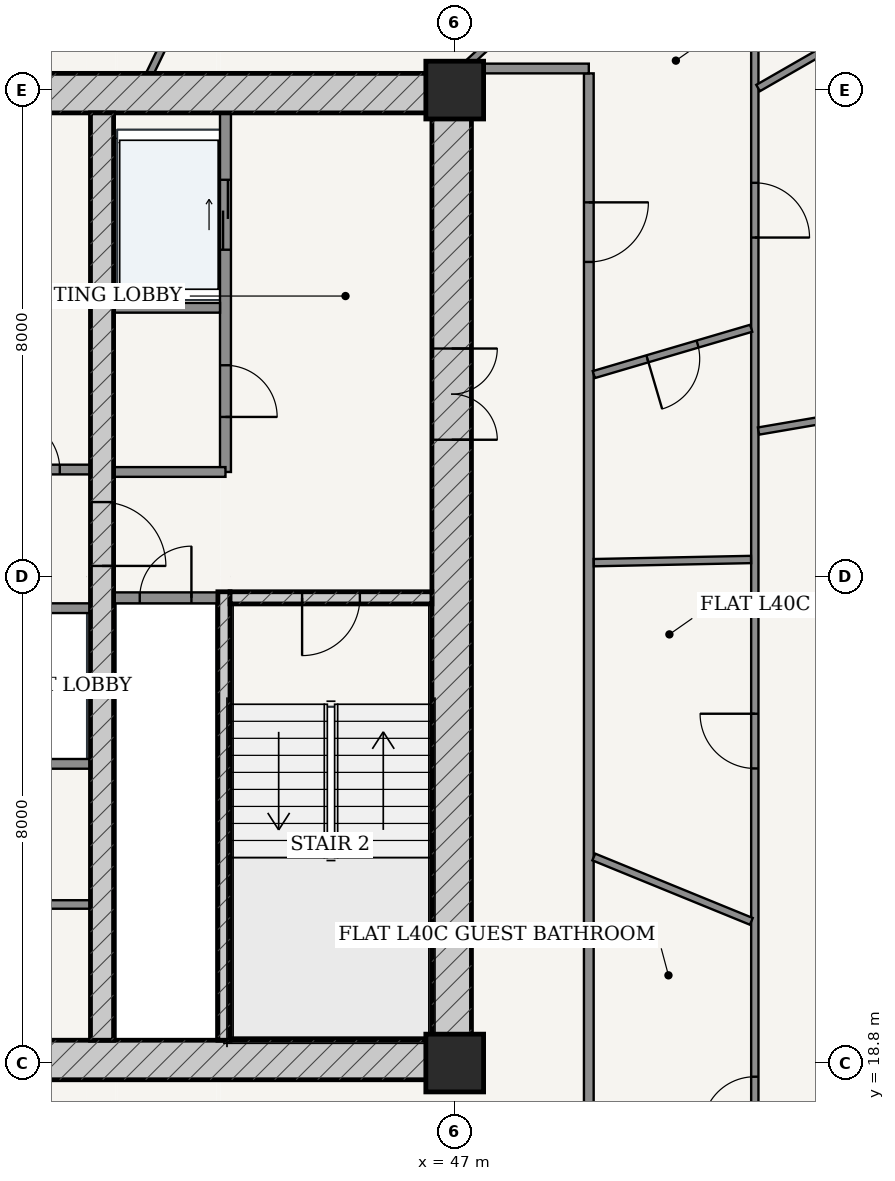
"""IFC4 building model, lengths in metres.
Left out: names, types, materials, properties, quantities, classifications, styles, units other than length and angle.
Written with IfcOpenShell. Run it as: python <this file> out.ifc"""

import sys

from ifc_helpers import new_model, si_unit, direction, frame, frame_2d, origin, origin_2d, place, context, subcontext, project, spatial, rectangle, extrude, source, transform, mapped, element, fill, save


model = new_model("IFC4")
c1 = context("Model", 3, precision=1e-05, world=origin(), true_north=direction((-0.2419218956, 0.970295726276)))
c2 = subcontext(c1, "Body", "Model", "MODEL_VIEW")
j1 = project(units=[si_unit("LENGTHUNIT", "METRE"), si_unit("PLANEANGLEUNIT", "RADIAN")], contexts=[c1])
p1 = place(None, origin())
s1 = spatial("IfcSite", under=j1, at=p1, CompositionType="ELEMENT")
p2 = place(p1, origin())
s2 = spatial("IfcBuilding", under=s1, at=p2, CompositionType="ELEMENT")
p3 = place(p2, frame((0.0, 0.0, 153.4)))
s3 = spatial("IfcBuildingStorey", under=s2, at=p3, CompositionType="ELEMENT", Elevation=153.4)
for number, where, z_axis, x_axis in (
    (1, (47.0, 18.8, 0.0), (0.0, 0.0, 1.0), (1.0, 0.0, 0.0)),
    (2, (47.0, 34.8, 0.0), (0.0, 0.0, 1.0), (1.0, 0.0, 0.0)),
):
    element("IfcColumn", number, at=place(p3, frame(where, z_axis=z_axis, x_axis=x_axis)), inside=s3, PredefinedType="COLUMN", context=c2, shape_type="SweptSolid", body=[
        extrude(rectangle(XDim=0.95, YDim=0.95, at=origin_2d()), origin(), (0.0, 0.0, 1.0), 3.6),
    ])
p4 = place(p3, frame((28.725, 18.85, 0.0), z_axis=(0.0, 0.0, 1.0), x_axis=(1.0, 0.0, 0.0)))
e3 = element("IfcWall", 3, at=p4, inside=s3, PredefinedType="SHEAR", context=c2, shape_type="SweptSolid", body=[
    extrude(rectangle(XDim=18.55, YDim=0.65, at=frame_2d((9.275, 0.0))), origin(), (0.0, 0.0, 1.0), 3.33),
])
p5 = place(p4, frame((7.51, 0.0, 0.0)))
e4 = element("IfcOpeningElement", 4, at=p5, cuts=e3, PredefinedType="OPENING", context=c2, shape_type="SweptSolid", body=[
    extrude(rectangle(XDim=0.85, YDim=2.1, at=frame_2d((0.425, 1.05))), frame((0.0, 0.335, 0.0), z_axis=(0.0, -1.0, 0.0), x_axis=(1.0, 0.0, 0.0)), (0.0, 0.0, 1.0), 0.67),
])
p6 = place(p4, frame((10.59, 0.0, 0.0)))
e5 = element("IfcOpeningElement", 5, at=p6, cuts=e3, PredefinedType="OPENING", context=c2, shape_type="SweptSolid", body=[
    extrude(rectangle(XDim=0.85, YDim=2.1, at=frame_2d((0.425, 1.05))), frame((0.0, 0.335, 0.0), z_axis=(0.0, -1.0, 0.0), x_axis=(1.0, 0.0, 0.0)), (0.0, 0.0, 1.0), 0.67),
])
p7 = place(p3, frame((28.725, 34.75, 0.0), z_axis=(0.0, 0.0, 1.0), x_axis=(1.0, 0.0, 0.0)))
e6 = element("IfcWall", 6, at=p7, inside=s3, PredefinedType="SHEAR", context=c2, shape_type="SweptSolid", body=[
    extrude(rectangle(XDim=18.55, YDim=0.65, at=frame_2d((9.275, 0.0))), origin(), (0.0, 0.0, 1.0), 3.33),
])
p8 = place(p3, frame((46.95, 19.175, 0.0), z_axis=(0.0, 0.0, 1.0), x_axis=(0.0, 1.0, 0.0)))
e7 = element("IfcWall", 7, at=p8, inside=s3, PredefinedType="SHEAR", context=c2, shape_type="SweptSolid", body=[
    extrude(rectangle(XDim=15.25, YDim=0.65, at=frame_2d((7.625, 0.0))), origin(), (0.0, 0.0, 1.0), 3.33),
])
p9 = place(p8, frame((9.875, 0.0, 0.0)))
e8 = element("IfcOpeningElement", 8, at=p9, cuts=e7, PredefinedType="OPENING", context=c2, shape_type="SweptSolid", body=[
    extrude(rectangle(XDim=1.5, YDim=2.2, at=frame_2d((0.75, 1.1))), frame((0.0, 0.335, 0.0), z_axis=(0.0, -1.0, 0.0), x_axis=(1.0, 0.0, 0.0)), (0.0, 0.0, 1.0), 0.67),
])
p10 = place(p3, frame((43.205, 19.175, 0.0), z_axis=(0.0, 0.0, 1.0), x_axis=(0.0, 1.0, 0.0)))
e9 = element("IfcWall", 9, at=p10, inside=s3, PredefinedType="SOLIDWALL", context=c2, shape_type="SweptSolid", body=[
    extrude(rectangle(XDim=7.375, YDim=0.2, at=frame_2d((3.688, 0.0))), origin(), (0.0, 0.0, 1.0), 3.33),
])
p11 = place(p3, frame((43.305, 26.45, 0.0), z_axis=(0.0, 0.0, 1.0), x_axis=(1.0, 0.0, 0.0)))
e10 = element("IfcWall", 10, at=p11, inside=s3, PredefinedType="SOLIDWALL", context=c2, shape_type="SweptSolid", body=[
    extrude(rectangle(XDim=3.32, YDim=0.2, at=frame_2d((1.66, 0.0))), origin(), (0.0, 0.0, 1.0), 3.33),
])
p12 = place(p11, frame((1.185, 0.0, 0.0)))
e11 = element("IfcOpeningElement", 11, at=p12, cuts=e10, PredefinedType="OPENING", context=c2, shape_type="SweptSolid", body=[
    extrude(rectangle(XDim=0.95, YDim=2.15, at=frame_2d((0.475, 1.075))), frame((0.0, 0.11, 0.0), z_axis=(0.0, -1.0, 0.0), x_axis=(1.0, 0.0, 0.0)), (0.0, 0.0, 1.0), 0.22),
])
p13 = place(p3, frame((41.2, 19.175, 0.0), z_axis=(0.0, 0.0, 1.0), x_axis=(0.0, 1.0, 0.0)))
e12 = element("IfcWall", 12, at=p13, inside=s3, PredefinedType="SHEAR", context=c2, shape_type="SweptSolid", body=[
    extrude(rectangle(XDim=15.25, YDim=0.38, at=frame_2d((7.625, 0.0))), origin(), (0.0, 0.0, 1.0), 3.33),
])
p14 = place(p13, frame((7.8, 0.0, 0.0)))
e13 = element("IfcOpeningElement", 13, at=p14, cuts=e12, PredefinedType="OPENING", context=c2, shape_type="SweptSolid", body=[
    extrude(rectangle(XDim=1.05, YDim=2.15, at=frame_2d((0.525, 1.075))), frame((0.0, 0.2, 0.0), z_axis=(0.0, -1.0, 0.0), x_axis=(1.0, 0.0, 0.0)), (0.0, 0.0, 1.0), 0.4),
])
p15 = place(p3, frame((41.39, 26.45, 0.0), z_axis=(0.0, 0.0, 1.0), x_axis=(1.0, 0.0, 0.0)))
e14 = element("IfcWall", 14, at=p15, inside=s3, PredefinedType="PARTITIONING", context=c2, shape_type="SweptSolid", body=[
    extrude(rectangle(XDim=1.71, YDim=0.18, at=frame_2d((0.855, 0.0))), origin(), (0.0, 0.0, 1.0), 3.33),
])
p16 = place(p15, frame((0.43, 0.0, 0.0)))
e15 = element("IfcOpeningElement", 15, at=p16, cuts=e14, PredefinedType="OPENING", context=c2, shape_type="SweptSolid", body=[
    extrude(rectangle(XDim=0.85, YDim=2.1, at=frame_2d((0.425, 1.05))), frame((0.0, 0.1, 0.0), z_axis=(0.0, -1.0, 0.0), x_axis=(1.0, 0.0, 0.0)), (0.0, 0.0, 1.0), 0.2),
])
p17 = place(p3, frame((43.23, 28.52, 0.0), z_axis=(0.0, 0.0, 1.0), x_axis=(0.0, 1.0, 0.0)))
e16 = element("IfcWall", 16, at=p17, inside=s3, PredefinedType="PARTITIONING", context=c2, shape_type="SweptSolid", body=[
    extrude(rectangle(XDim=5.905, YDim=0.18, at=frame_2d((2.953, 0.0))), origin(), (0.0, 0.0, 1.0), 3.33),
])
p18 = place(p17, frame((0.905, 0.0, 0.0)))
e17 = element("IfcOpeningElement", 17, at=p18, cuts=e16, PredefinedType="OPENING", context=c2, shape_type="SweptSolid", body=[
    extrude(rectangle(XDim=0.85, YDim=2.1, at=frame_2d((0.425, 1.05))), frame((0.0, 0.1, 0.0), z_axis=(0.0, -1.0, 0.0), x_axis=(1.0, 0.0, 0.0)), (0.0, 0.0, 1.0), 0.2),
])
p19 = place(p17, frame((3.655, 0.0, 0.0)))
e18 = element("IfcOpeningElement", 18, at=p19, cuts=e16, PredefinedType="OPENING", context=c2, shape_type="SweptSolid", body=[
    extrude(rectangle(XDim=1.15, YDim=2.2, at=frame_2d((0.575, 1.1))), frame((0.0, 0.1, 0.0), z_axis=(0.0, -1.0, 0.0), x_axis=(1.0, 0.0, 0.0)), (0.0, 0.0, 1.0), 0.2),
])
p20 = place(p3, frame((41.39, 31.22, 0.0), z_axis=(0.0, 0.0, 1.0), x_axis=(1.0, 0.0, 0.0)))
e19 = element("IfcWall", 19, at=p20, inside=s3, PredefinedType="PARTITIONING", context=c2, shape_type="SweptSolid", body=[
    extrude(rectangle(XDim=1.75, YDim=0.16, at=frame_2d((0.875, 0.0))), origin(), (0.0, 0.0, 1.0), 3.33),
])
p21 = place(p3, frame((41.39, 28.52, 0.0), z_axis=(0.0, 0.0, 1.0), x_axis=(1.0, 0.0, 0.0)))
e20 = element("IfcWall", 20, at=p21, inside=s3, PredefinedType="PARTITIONING", context=c2, shape_type="SweptSolid", body=[
    extrude(rectangle(XDim=1.84, YDim=0.16, at=frame_2d((0.92, 0.0))), origin(), (0.0, 0.0, 1.0), 3.33),
])
p22 = place(p3, frame((34.99, 28.56, 0.0), z_axis=(0.0, 0.0, 1.0), x_axis=(1.0, 0.0, 0.0)))
e21 = element("IfcWall", 21, at=p22, inside=s3, PredefinedType="PARTITIONING", context=c2, shape_type="SweptSolid", body=[
    extrude(rectangle(XDim=6.02, YDim=0.16, at=frame_2d((3.01, 0.0))), origin(), (0.0, 0.0, 1.0), 3.33),
])
p23 = place(p22, frame((0.505, 0.0, 0.0)))
e22 = element("IfcOpeningElement", 22, at=p23, cuts=e21, PredefinedType="OPENING", context=c2, shape_type="SweptSolid", body=[
    extrude(rectangle(XDim=0.85, YDim=2.1, at=frame_2d((0.425, 1.05))), frame((0.0, 0.09, 0.0), z_axis=(0.0, -1.0, 0.0), x_axis=(1.0, 0.0, 0.0)), (0.0, 0.0, 1.0), 0.18),
])
p24 = place(p22, frame((2.58, 0.0, 0.0)))
e23 = element("IfcOpeningElement", 23, at=p24, cuts=e21, PredefinedType="OPENING", context=c2, shape_type="SweptSolid", body=[
    extrude(rectangle(XDim=0.86, YDim=2.1, at=frame_2d((0.43, 1.05))), frame((0.0, 0.09, 0.0), z_axis=(0.0, -1.0, 0.0), x_axis=(1.0, 0.0, 0.0)), (0.0, 0.0, 1.0), 0.18),
])
p25 = place(p22, frame((4.665, 0.0, 0.0)))
e24 = element("IfcOpeningElement", 24, at=p25, cuts=e21, PredefinedType="OPENING", context=c2, shape_type="SweptSolid", body=[
    extrude(rectangle(XDim=0.85, YDim=2.1, at=frame_2d((0.425, 1.05))), frame((0.0, 0.09, 0.0), z_axis=(0.0, -1.0, 0.0), x_axis=(1.0, 0.0, 0.0)), (0.0, 0.0, 1.0), 0.18),
])
p26 = place(p3, frame((34.99, 26.28, 0.0), z_axis=(0.0, 0.0, 1.0), x_axis=(1.0, 0.0, 0.0)))
e25 = element("IfcWall", 25, at=p26, inside=s3, PredefinedType="PARTITIONING", context=c2, shape_type="SweptSolid", body=[
    extrude(rectangle(XDim=6.02, YDim=0.16, at=frame_2d((3.01, 0.0))), origin(), (0.0, 0.0, 1.0), 3.33),
])
p27 = place(p26, frame((0.225, 0.0, 0.0)))
e26 = element("IfcOpeningElement", 26, at=p27, cuts=e25, PredefinedType="OPENING", context=c2, shape_type="SweptSolid", body=[
    extrude(rectangle(XDim=1.1, YDim=2.2, at=frame_2d((0.55, 1.1))), frame((0.0, 0.09, 0.0), z_axis=(0.0, -1.0, 0.0), x_axis=(1.0, 0.0, 0.0)), (0.0, 0.0, 1.0), 0.18),
])
p28 = place(p26, frame((1.705, 0.0, 0.0)))
e27 = element("IfcOpeningElement", 27, at=p28, cuts=e25, PredefinedType="OPENING", context=c2, shape_type="SweptSolid", body=[
    extrude(rectangle(XDim=1.1, YDim=2.2, at=frame_2d((0.55, 1.1))), frame((0.0, 0.09, 0.0), z_axis=(0.0, -1.0, 0.0), x_axis=(1.0, 0.0, 0.0)), (0.0, 0.0, 1.0), 0.18),
])
p29 = place(p3, frame((34.99, 23.72, 0.0), z_axis=(0.0, 0.0, 1.0), x_axis=(1.0, 0.0, 0.0)))
e28 = element("IfcWall", 28, at=p29, inside=s3, PredefinedType="PARTITIONING", context=c2, shape_type="SweptSolid", body=[
    extrude(rectangle(XDim=6.02, YDim=0.16, at=frame_2d((3.01, 0.0))), origin(), (0.0, 0.0, 1.0), 3.33),
])
p30 = place(p3, frame((38.4, 21.407, 0.0), z_axis=(0.0, 0.0, 1.0), x_axis=(1.0, 0.0, 0.0)))
e29 = element("IfcWall", 29, at=p30, inside=s3, PredefinedType="PARTITIONING", context=c2, shape_type="SweptSolid", body=[
    extrude(rectangle(XDim=2.61, YDim=0.14, at=frame_2d((1.305, 0.0))), origin(), (0.0, 0.0, 1.0), 3.33),
])
p31 = place(p30, frame((0.88, 0.0, 0.0)))
e30 = element("IfcOpeningElement", 30, at=p31, cuts=e29, PredefinedType="OPENING", context=c2, shape_type="SweptSolid", body=[
    extrude(rectangle(XDim=0.85, YDim=2.1, at=frame_2d((0.425, 1.05))), frame((0.0, 0.08, 0.0), z_axis=(0.0, -1.0, 0.0), x_axis=(1.0, 0.0, 0.0)), (0.0, 0.0, 1.0), 0.16),
])
p32 = place(p3, frame((49.205, 16.675, 0.0), z_axis=(0.0, 0.0, 1.0), x_axis=(0.0, 1.0, 0.0)))
e31 = element("IfcWall", 31, at=p32, inside=s3, PredefinedType="PARTITIONING", context=c2, shape_type="SweptSolid", body=[
    extrude(rectangle(XDim=18.4, YDim=0.16, at=frame_2d((9.2, 0.0))), origin(), (0.0, 0.0, 1.0), 2.776),
])
p33 = place(p32, frame((15.299, 0.0, 0.0)))
e32 = element("IfcOpeningElement", 32, at=p33, cuts=e31, PredefinedType="OPENING", context=c2, shape_type="SweptSolid", body=[
    extrude(rectangle(XDim=0.98, YDim=2.2, at=frame_2d((0.49, 1.1))), frame((0.0, 0.09, 0.0), z_axis=(0.0, -1.0, 0.0), x_axis=(1.0, 0.0, 0.0)), (0.0, 0.0, 1.0), 0.18),
])
p34 = place(p3, frame((47.275, 35.155, 0.0), z_axis=(0.0, 0.0, 1.0), x_axis=(1.0, 0.0, 0.0)))
e33 = element("IfcWall", 33, at=p34, inside=s3, PredefinedType="PARTITIONING", context=c2, shape_type="SweptSolid", body=[
    extrude(rectangle(XDim=1.93, YDim=0.16, at=frame_2d((0.965, 0.0))), origin(), (0.0, 0.0, 1.0), 2.776),
])
p35 = place(p3, frame((51.935, 37.885, 0.0), z_axis=(0.0, 0.0, 1.0), x_axis=(0.0, -1.0, 0.0)))
e34 = element("IfcWall", 34, at=p35, inside=s3, PredefinedType="PARTITIONING", context=c2, shape_type="SweptSolid", body=[
    extrude(rectangle(XDim=22.96, YDim=0.12, at=frame_2d((11.48, 0.0))), origin(), (0.0, 0.0, 1.0), 2.776),
])
p36 = place(p35, frame((4.61, 0.0, 0.0)))
e35 = element("IfcOpeningElement", 35, at=p36, cuts=e34, PredefinedType="OPENING", context=c2, shape_type="SweptSolid", body=[
    extrude(rectangle(XDim=0.9, YDim=2.15, at=frame_2d((0.45, 1.075))), frame((0.0, 0.07, 0.0), z_axis=(0.0, -1.0, 0.0), x_axis=(1.0, 0.0, 0.0)), (0.0, 0.0, 1.0), 0.14),
])
p37 = place(p35, frame((19.31, 0.0, 0.0)))
e36 = element("IfcOpeningElement", 36, at=p37, cuts=e34, PredefinedType="OPENING", context=c2, shape_type="SweptSolid", body=[
    extrude(rectangle(XDim=0.86, YDim=2.15, at=frame_2d((0.43, 1.075))), frame((0.0, 0.07, 0.0), z_axis=(0.0, -1.0, 0.0), x_axis=(1.0, 0.0, 0.0)), (0.0, 0.0, 1.0), 0.14),
])
p38 = place(p35, frame((13.341, 0.0, 0.0)))
e37 = element("IfcOpeningElement", 37, at=p38, cuts=e34, PredefinedType="OPENING", context=c2, shape_type="SweptSolid", body=[
    extrude(rectangle(XDim=0.9, YDim=2.15, at=frame_2d((0.45, 1.075))), frame((0.0, 0.07, 0.0), z_axis=(0.0, -1.0, 0.0), x_axis=(1.0, 0.0, 0.0)), (0.0, 0.0, 1.0), 0.14),
])
p39 = place(p3, frame((51.996, 29.193, 0.0), z_axis=(0.0, 0.0, 1.0), x_axis=(0.985698378271, 0.168519159369, 0.0)))
e38 = element("IfcWall", 38, at=p39, inside=s3, PredefinedType="PARTITIONING", context=c2, shape_type="SweptSolid", body=[
    extrude(rectangle(XDim=9.769, YDim=0.12, at=frame_2d((4.884, 0.0))), origin(), (0.0, 0.0, 1.0), 2.776),
])
p40 = place(p39, frame((3.428, 0.0, 0.0)))
e39 = element("IfcOpeningElement", 39, at=p40, cuts=e38, PredefinedType="OPENING", context=c2, shape_type="SweptSolid", body=[
    extrude(rectangle(XDim=0.9, YDim=2.15, at=frame_2d((0.45, 1.075))), frame((0.0, 0.07, 0.0), z_axis=(0.0, -1.0, 0.0), x_axis=(1.0, 0.0, 0.0)), (0.0, 0.0, 1.0), 0.14),
])
p41 = place(p3, frame((51.989, 34.834, 0.0), z_axis=(0.0, 0.0, 1.0), x_axis=(0.86717064002, 0.498011125466, 0.0)))
e40 = element("IfcWall", 40, at=p41, inside=s3, PredefinedType="PARTITIONING", context=c2, shape_type="SweptSolid", body=[
    extrude(rectangle(XDim=6.961, YDim=0.12, at=frame_2d((3.48, 0.0))), origin(), (0.0, 0.0, 1.0), 2.776),
])
p42 = place(p3, frame((49.287, 22.188, 0.0), z_axis=(0.0, 0.0, 1.0), x_axis=(0.925708058909, -0.378238799796, 0.0)))
e41 = element("IfcWall", 41, at=p42, inside=s3, PredefinedType="PARTITIONING", context=c2, shape_type="SweptSolid", body=[
    extrude(rectangle(XDim=2.799, YDim=0.12, at=frame_2d((1.399, 0.0))), origin(), (0.0, 0.0, 1.0), 3.33),
])
p43 = place(p3, frame((49.287, 27.029, 0.0), z_axis=(0.0, 0.0, 1.0), x_axis=(0.999794052369, 0.020294157974, 0.0)))
e42 = element("IfcWall", 42, at=p43, inside=s3, PredefinedType="PARTITIONING", context=c2, shape_type="SweptSolid", body=[
    extrude(rectangle(XDim=2.586, YDim=0.12, at=frame_2d((1.293, 0.0))), origin(), (0.0, 0.0, 1.0), 3.33),
])
p44 = place(p3, frame((49.287, 30.121, 0.0), z_axis=(0.0, 0.0, 1.0), x_axis=(0.959304970846, 0.282372046969, 0.0)))
e43 = element("IfcWall", 43, at=p44, inside=s3, PredefinedType="PARTITIONING", context=c2, shape_type="SweptSolid", body=[
    extrude(rectangle(XDim=2.698, YDim=0.12, at=frame_2d((1.349, 0.0))), origin(), (0.0, 0.0, 1.0), 3.33),
])
p45 = place(p44, frame((0.919, 0.0, 0.0)))
e44 = element("IfcOpeningElement", 44, at=p45, cuts=e43, PredefinedType="OPENING", context=c2, shape_type="SweptSolid", body=[
    extrude(rectangle(XDim=0.86, YDim=2.15, at=frame_2d((0.43, 1.075))), frame((0.0, 0.07, 0.0), z_axis=(0.0, -1.0, 0.0), x_axis=(1.0, 0.0, 0.0)), (0.0, 0.0, 1.0), 0.14),
])
p46 = place(p3, frame((47.216, 35.235, 0.0), z_axis=(0.0, 0.0, 1.0), x_axis=(0.73766811085, 0.675163504816, 0.0)))
e45 = element("IfcWall", 45, at=p46, inside=s3, PredefinedType="PARTITIONING", context=c2, shape_type="SweptSolid", body=[
    extrude(rectangle(XDim=3.863, YDim=0.12, at=frame_2d((1.932, 0.0))), origin(), (0.0, 0.0, 1.0), 2.776),
])
p47 = place(p46, frame((1.481, 0.0, 0.0)))
e46 = element("IfcOpeningElement", 46, at=p47, cuts=e45, PredefinedType="OPENING", context=c2, shape_type="SweptSolid", body=[
    extrude(rectangle(XDim=0.9, YDim=2.15, at=frame_2d((0.45, 1.075))), frame((0.0, 0.07, 0.0), z_axis=(0.0, -1.0, 0.0), x_axis=(1.0, 0.0, 0.0)), (0.0, 0.0, 1.0), 0.14),
])
p48 = place(p3, frame((41.988, 35.075, 0.0), z_axis=(0.0, 0.0, 1.0), x_axis=(0.434144408634, 0.900843289619, 0.0)))
e47 = element("IfcWall", 47, at=p48, inside=s3, PredefinedType="PARTITIONING", context=c2, shape_type="SweptSolid", body=[
    extrude(rectangle(XDim=2.88, YDim=0.12, at=frame_2d((1.44, 0.0))), origin(), (0.0, 0.0, 1.0), 3.33),
])
m1 = source(origin(), c2, "Body", "SweptSolid", [
    extrude(rectangle(XDim=1.5, YDim=2.2, at=frame_2d((0.75, 1.1))), frame((0.0, 0.025, 0.0), z_axis=(0.0, -1.0, 0.0), x_axis=(1.0, 0.0, 0.0)), (0.0, 0.0, 1.0), 0.05),
])
p49 = place(p9, frame((1.5, 0.0, 0.0), z_axis=(0.0, 0.0, 1.0), x_axis=(-1.0, 0.0, 0.0)))
e48 = element("IfcDoor", 48, at=p49, inside=s3, OperationType="DOUBLE_DOOR_SINGLE_SWING", PredefinedType="DOOR", context=c2, shape_type="MappedRepresentation", body=[
    mapped(m1, transform((0.0, 0.0, 0.0), scale=1.0)),
])
fill(e8, e48)
m2 = source(origin(), c2, "Body", "SweptSolid", [
    extrude(rectangle(XDim=1.05, YDim=2.15, at=frame_2d((0.525, 1.075))), frame((0.0, 0.025, 0.0), z_axis=(0.0, -1.0, 0.0), x_axis=(1.0, 0.0, 0.0)), (0.0, 0.0, 1.0), 0.05),
])
p50 = place(p14, frame((1.05, 0.0, 0.0), z_axis=(0.0, 0.0, 1.0), x_axis=(-1.0, 0.0, 0.0)))
e49 = element("IfcDoor", 49, at=p50, inside=s3, OperationType="SINGLE_SWING_RIGHT", PredefinedType="DOOR", context=c2, shape_type="MappedRepresentation", body=[
    mapped(m2, transform((0.0, 0.0, 0.0), scale=1.0)),
])
fill(e13, e49)
m3 = source(origin(), c2, "Body", "SweptSolid", [
    extrude(rectangle(XDim=0.95, YDim=2.15, at=frame_2d((0.475, 1.075))), frame((0.0, 0.025, 0.0), z_axis=(0.0, -1.0, 0.0), x_axis=(1.0, 0.0, 0.0)), (0.0, 0.0, 1.0), 0.05),
])
p51 = place(p12, frame((0.95, 0.0, 0.0), z_axis=(0.0, 0.0, 1.0), x_axis=(-1.0, 0.0, 0.0)))
e50 = element("IfcDoor", 50, at=p51, inside=s3, OperationType="SINGLE_SWING_RIGHT", PredefinedType="DOOR", context=c2, shape_type="MappedRepresentation", body=[
    mapped(m3, transform((0.0, 0.0, 0.0), scale=1.0)),
])
fill(e11, e50)
m4 = source(origin(), c2, "Body", "SweptSolid", [
    extrude(rectangle(XDim=0.85, YDim=2.1, at=frame_2d((0.425, 1.05))), frame((0.0, 0.025, 0.0), z_axis=(0.0, -1.0, 0.0), x_axis=(1.0, 0.0, 0.0)), (0.0, 0.0, 1.0), 0.05),
])
p52 = place(p16, origin())
e51 = element("IfcDoor", 51, at=p52, inside=s3, OperationType="SINGLE_SWING_RIGHT", PredefinedType="DOOR", context=c2, shape_type="MappedRepresentation", body=[
    mapped(m4, transform((0.0, 0.0, 0.0), scale=1.0)),
])
fill(e15, e51)
p53 = place(p18, frame((0.85, 0.0, 0.0), z_axis=(0.0, 0.0, 1.0), x_axis=(-1.0, 0.0, 0.0)))
e52 = element("IfcDoor", 52, at=p53, inside=s3, OperationType="SINGLE_SWING_RIGHT", PredefinedType="DOOR", context=c2, shape_type="MappedRepresentation", body=[
    mapped(m4, transform((0.0, 0.0, 0.0), scale=1.0)),
])
fill(e17, e52)
p54 = place(p25, origin())
e53 = element("IfcDoor", 53, at=p54, inside=s3, OperationType="SINGLE_SWING_LEFT", PredefinedType="DOOR", context=c2, shape_type="MappedRepresentation", body=[
    mapped(m4, transform((0.0, 0.0, 0.0), scale=1.0)),
])
fill(e24, e53)
m5 = source(origin(), c2, "Body", "SweptSolid", [
    extrude(rectangle(XDim=1.15, YDim=2.2, at=frame_2d((0.575, 1.1))), frame((0.0, 0.025, 0.0), z_axis=(0.0, -1.0, 0.0), x_axis=(1.0, 0.0, 0.0)), (0.0, 0.0, 1.0), 0.05),
])
p55 = place(p19, origin())
e54 = element("IfcDoor", 54, at=p55, inside=s3, OperationType="DOUBLE_DOOR_SLIDING", PredefinedType="DOOR", context=c2, shape_type="MappedRepresentation", body=[
    mapped(m5, transform((0.0, 0.0, 0.0), scale=1.0)),
])
fill(e18, e54)
m6 = source(origin(), c2, "Body", "SweptSolid", [
    extrude(rectangle(XDim=0.98, YDim=2.2, at=frame_2d((0.49, 1.1))), frame((0.0, 0.025, 0.0), z_axis=(0.0, -1.0, 0.0), x_axis=(1.0, 0.0, 0.0)), (0.0, 0.0, 1.0), 0.05),
])
p56 = place(p33, frame((0.98, 0.0, 0.0), z_axis=(0.0, 0.0, 1.0), x_axis=(-1.0, 0.0, 0.0)))
e55 = element("IfcDoor", 55, at=p56, inside=s3, OperationType="SINGLE_SWING_LEFT", PredefinedType="DOOR", context=c2, shape_type="MappedRepresentation", body=[
    mapped(m6, transform((0.0, 0.0, 0.0), scale=1.0)),
])
fill(e32, e55)
m7 = source(origin(), c2, "Body", "SweptSolid", [
    extrude(rectangle(XDim=0.86, YDim=2.15, at=frame_2d((0.43, 1.075))), frame((0.0, 0.025, 0.0), z_axis=(0.0, -1.0, 0.0), x_axis=(1.0, 0.0, 0.0)), (0.0, 0.0, 1.0), 0.05),
])
p57 = place(p45, frame((0.86, 0.0, 0.0), z_axis=(0.0, 0.0, 1.0), x_axis=(-1.0, 0.0, 0.0)))
e56 = element("IfcDoor", 56, at=p57, inside=s3, OperationType="SINGLE_SWING_RIGHT", PredefinedType="DOOR", context=c2, shape_type="MappedRepresentation", body=[
    mapped(m7, transform((0.0, 0.0, 0.0), scale=1.0)),
])
fill(e44, e56)
m8 = source(origin(), c2, "Body", "SweptSolid", [
    extrude(rectangle(XDim=0.9, YDim=2.15, at=frame_2d((0.45, 1.075))), frame((0.0, 0.025, 0.0), z_axis=(0.0, -1.0, 0.0), x_axis=(1.0, 0.0, 0.0)), (0.0, 0.0, 1.0), 0.05),
])
p58 = place(p36, origin())
e57 = element("IfcDoor", 57, at=p58, inside=s3, OperationType="SINGLE_SWING_RIGHT", PredefinedType="DOOR", context=c2, shape_type="MappedRepresentation", body=[
    mapped(m8, transform((0.0, 0.0, 0.0), scale=1.0)),
])
fill(e35, e57)
p59 = place(p37, frame((0.86, 0.0, 0.0), z_axis=(0.0, 0.0, 1.0), x_axis=(-1.0, 0.0, 0.0)))
e58 = element("IfcDoor", 58, at=p59, inside=s3, OperationType="SINGLE_SWING_LEFT", PredefinedType="DOOR", context=c2, shape_type="MappedRepresentation", body=[
    mapped(m7, transform((0.0, 0.0, 0.0), scale=1.0)),
])
fill(e36, e58)
p60 = place(p38, frame((0.9, 0.0, 0.0), z_axis=(0.0, 0.0, 1.0), x_axis=(-1.0, 0.0, 0.0)))
e59 = element("IfcDoor", 59, at=p60, inside=s3, OperationType="SINGLE_SWING_RIGHT", PredefinedType="DOOR", context=c2, shape_type="MappedRepresentation", body=[
    mapped(m8, transform((0.0, 0.0, 0.0), scale=1.0)),
])
fill(e37, e59)
save(model, sys.argv[1])
